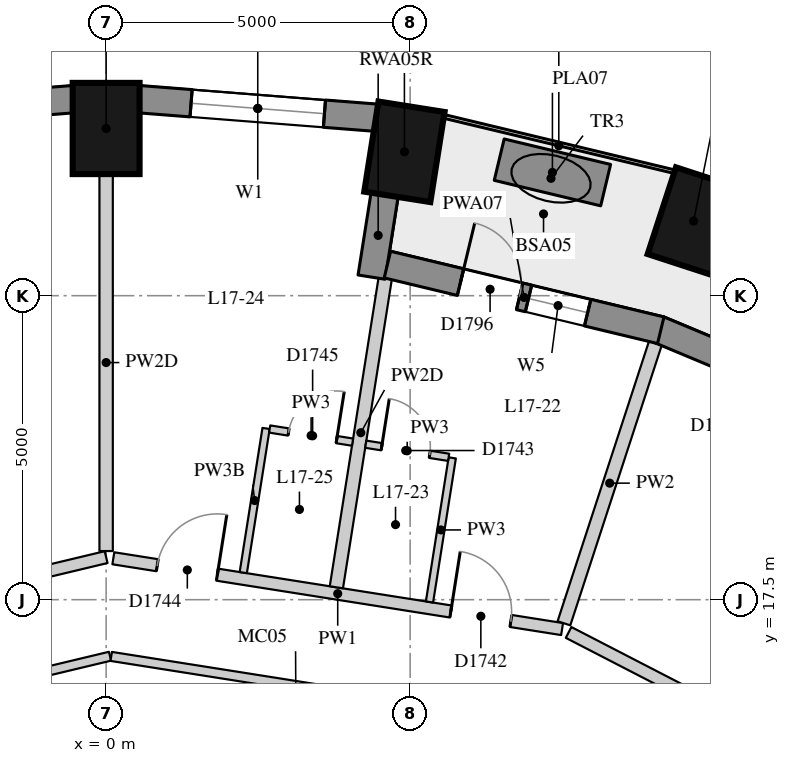
"""IFC4 building model, lengths in metres.
Left out: names, types, materials, properties, quantities, classifications, styles, units other than length and angle.
Written with IfcOpenShell. Run it as: python <this file> out.ifc"""

import sys

from ifc_helpers import new_model, si_unit, direction, frame, frame_2d, origin, origin_2d, place, context, subcontext, project, spatial, rectangle, extrude, element, fill, save


model = new_model("IFC4")
c1 = context("Model", 3, precision=1e-05, world=origin(), true_north=direction((0.0, 1.0)))
c2 = subcontext(c1, "Body", "Model", "MODEL_VIEW")
j1 = project(units=[si_unit("LENGTHUNIT", "METRE"), si_unit("PLANEANGLEUNIT", "RADIAN")], contexts=[c1])
p1 = place(None, origin())
s1 = spatial("IfcSite", under=j1, at=p1, CompositionType="ELEMENT")
p2 = place(p1, origin())
s2 = spatial("IfcBuilding", under=s1, at=p2, CompositionType="ELEMENT")
p3 = place(p2, frame((0.0, 0.0, 64.6)))
s3 = spatial("IfcBuildingStorey", under=s2, at=p3, CompositionType="ELEMENT", Elevation=64.6)
for number, where, z_axis, x_axis in (
    (1, (9.662, 23.727, 0.0), (0.0, 0.0, 1.0), (0.31, 0.951, 0.0)),
    (2, (4.906, 24.866, 0.0), (0.0, 0.0, 1.0), (0.156, 0.988, 0.0)),
    (3, (0.0, 25.25, 0.0), (0.0, 0.0, 1.0), (0.0, 1.0, 0.0)),
):
    element("IfcColumn", number, at=place(p3, frame(where, z_axis=z_axis, x_axis=x_axis)), inside=s3, PredefinedType="COLUMN", context=c2, shape_type="SweptSolid", body=[
        extrude(rectangle(XDim=1.5, YDim=1.1, at=origin_2d()), origin(), (0.0, 0.0, 1.0), 3.3),
    ])
p4 = place(p3, frame((4.457, 25.426, 0.0), z_axis=(0.0, 0.0, 1.0), x_axis=(-0.996955972145, 0.077966592873, 0.0)))
e4 = element("IfcWall", 4, at=p4, inside=s3, PredefinedType="SOLIDWALL", context=c2, shape_type="SweptSolid", body=[
    extrude(rectangle(XDim=3.939, YDim=0.45, at=frame_2d((1.97, 0.0))), origin(), (0.0, 0.0, 1.0), 3.02),
])
p5 = place(p4, frame((0.87, 0.0, 0.4)))
e5 = element("IfcOpeningElement", 5, at=p5, cuts=e4, PredefinedType="OPENING", context=c2, shape_type="SweptSolid", body=[
    extrude(rectangle(XDim=2.2, YDim=1.75, at=frame_2d((1.1, 0.875))), frame((0.0, 0.235, 0.0), z_axis=(0.0, -1.0, 0.0), x_axis=(1.0, 0.0, 0.0)), (0.0, 0.0, 1.0), 0.47),
])
p6 = place(p3, frame((-0.53, 25.733, 0.0), z_axis=(0.0, 0.0, 1.0), x_axis=(-0.996955972145, -0.077966592873, 0.0)))
e6 = element("IfcWall", 6, at=p6, inside=s3, PredefinedType="SOLIDWALL", context=c2, shape_type="SweptSolid", body=[
    extrude(rectangle(XDim=3.939, YDim=0.45, at=frame_2d((1.97, 0.0))), origin(), (0.0, 0.0, 1.0), 3.02),
])
p7 = place(p6, frame((0.87, 0.0, 0.4)))
e7 = element("IfcOpeningElement", 7, at=p7, cuts=e6, PredefinedType="OPENING", context=c2, shape_type="SweptSolid", body=[
    extrude(rectangle(XDim=2.2, YDim=1.75, at=frame_2d((1.1, 0.875))), frame((0.0, 0.235, 0.0), z_axis=(0.0, -1.0, 0.0), x_axis=(1.0, 0.0, 0.0)), (0.0, 0.0, 1.0), 0.47),
])
p8 = place(p3, frame((4.583, 24.178, 0.0), z_axis=(0.0, 0.0, 1.0), x_axis=(-0.156133927791, -0.98773589415, 0.0)))
e8 = element("IfcWall", 8, at=p8, inside=s3, PredefinedType="SOLIDWALL", context=c2, shape_type="SweptSolid", body=[
    extrude(rectangle(XDim=1.39, YDim=0.45, at=frame_2d((0.695, 0.0))), origin(), (0.0, 0.0, 1.0), 2.47),
])
p9 = place(p3, frame((13.31, 20.178, 0.0), z_axis=(0.0, 0.0, 1.0), x_axis=(-0.922634412489, 0.385675693935, 0.0)))
e9 = element("IfcWall", 9, at=p9, inside=s3, PredefinedType="SOLIDWALL", context=c2, shape_type="SweptSolid", body=[
    extrude(rectangle(XDim=4.577, YDim=0.45, at=frame_2d((2.288, 0.0))), origin(), (0.0, 0.0, 1.0), 3.02),
])
p10 = place(p9, frame((1.213, 0.0, 0.4)))
e10 = element("IfcOpeningElement", 10, at=p10, cuts=e9, PredefinedType="OPENING", context=c2, shape_type="SweptSolid", body=[
    extrude(rectangle(XDim=1.0, YDim=1.75, at=frame_2d((0.5, 0.875))), frame((0.0, 0.235, 0.0), z_axis=(0.0, -1.0, 0.0), x_axis=(1.0, 0.0, 0.0)), (0.0, 0.0, 1.0), 0.47),
])
p11 = place(p9, frame((2.363, 0.0, 0.0)))
e11 = element("IfcOpeningElement", 11, at=p11, cuts=e9, PredefinedType="OPENING", context=c2, shape_type="SweptSolid", body=[
    extrude(rectangle(XDim=1.0, YDim=2.15, at=frame_2d((0.5, 1.075))), frame((0.0, 0.235, 0.0), z_axis=(0.0, -1.0, 0.0), x_axis=(1.0, 0.0, 0.0)), (0.0, 0.0, 1.0), 0.47),
])
p12 = place(p3, frame((9.122, 21.932, 0.0), z_axis=(0.0, 0.0, 1.0), x_axis=(-0.972346547441, 0.233542697764, 0.0)))
e12 = element("IfcWall", 12, at=p12, inside=s3, PredefinedType="SOLIDWALL", context=c2, shape_type="SweptSolid", body=[
    extrude(rectangle(XDim=4.624, YDim=0.45, at=frame_2d((2.312, 0.0))), origin(), (0.0, 0.0, 1.0), 3.02),
])
p13 = place(p12, frame((1.237, 0.0, 0.4)))
e13 = element("IfcOpeningElement", 13, at=p13, cuts=e12, PredefinedType="OPENING", context=c2, shape_type="SweptSolid", body=[
    extrude(rectangle(XDim=1.0, YDim=1.75, at=frame_2d((0.5, 0.875))), frame((0.0, 0.235, 0.0), z_axis=(0.0, -1.0, 0.0), x_axis=(1.0, 0.0, 0.0)), (0.0, 0.0, 1.0), 0.47),
])
p14 = place(p12, frame((2.387, 0.0, 0.0)))
e14 = element("IfcOpeningElement", 14, at=p14, cuts=e12, PredefinedType="OPENING", context=c2, shape_type="SweptSolid", body=[
    extrude(rectangle(XDim=1.0, YDim=2.15, at=frame_2d((0.5, 1.075))), frame((0.0, 0.235, 0.0), z_axis=(0.0, -1.0, 0.0), x_axis=(1.0, 0.0, 0.0)), (0.0, 0.0, 1.0), 0.47),
])
p15 = place(p3, frame((8.215, 24.318, 0.0), z_axis=(0.0, 0.0, 1.0), x_axis=(-0.972504142103, 0.232885580473, 0.0)))
e15 = element("IfcWall", 15, at=p15, inside=s3, PredefinedType="USERDEFINED", context=c2, shape_type="SweptSolid", body=[
    extrude(rectangle(XDim=1.8, YDim=0.7, at=frame_2d((0.9, 0.0))), origin(), (0.0, 0.0, 1.0), 0.75),
])
p16 = place(p3, frame((-10.852, 15.605, 0.0), z_axis=(0.0, 0.0, 1.0), x_axis=(0.972573296372, 0.232596610431, 0.0)))
e16 = element("IfcWall", 16, at=p16, inside=s3, PredefinedType="PARTITIONING", context=c2, shape_type="SweptSolid", body=[
    extrude(rectangle(XDim=11.157, YDim=0.2, at=frame_2d((5.579, 0.0))), origin(), (0.0, 0.0, 1.0), 3.02),
])
p17 = place(p16, frame((6.029, 0.0, 0.0)))
e17 = element("IfcOpeningElement", 17, at=p17, cuts=e16, PredefinedType="OPENING", context=c2, shape_type="SweptSolid", body=[
    extrude(rectangle(XDim=1.1, YDim=2.1, at=frame_2d((0.55, 1.05))), frame((0.0, 0.11, 0.0), z_axis=(0.0, -1.0, 0.0), x_axis=(1.0, 0.0, 0.0)), (0.0, 0.0, 1.0), 0.22),
])
p18 = place(p16, frame((0.705, 0.0, 0.0)))
e18 = element("IfcOpeningElement", 18, at=p18, cuts=e16, PredefinedType="OPENING", context=c2, shape_type="SweptSolid", body=[
    extrude(rectangle(XDim=1.0, YDim=2.1, at=frame_2d((0.5, 1.05))), frame((0.0, 0.11, 0.0), z_axis=(0.0, -1.0, 0.0), x_axis=(1.0, 0.0, 0.0)), (0.0, 0.0, 1.0), 0.22),
])
p19 = place(p3, frame((0.119, 18.181, 0.0), z_axis=(0.0, 0.0, 1.0), x_axis=(0.987788122462, -0.155803161464, 0.0)))
e19 = element("IfcWall", 19, at=p19, inside=s3, PredefinedType="PARTITIONING", context=c2, shape_type="SweptSolid", body=[
    extrude(rectangle(XDim=7.471, YDim=0.2, at=frame_2d((3.736, 0.0))), origin(), (0.0, 0.0, 1.0), 3.02),
])
p20 = place(p19, frame((5.619, 0.0, 0.0)))
e20 = element("IfcOpeningElement", 20, at=p20, cuts=e19, PredefinedType="OPENING", context=c2, shape_type="SweptSolid", body=[
    extrude(rectangle(XDim=1.0, YDim=2.1, at=frame_2d((0.5, 1.05))), frame((0.0, 0.11, 0.0), z_axis=(0.0, -1.0, 0.0), x_axis=(1.0, 0.0, 0.0)), (0.0, 0.0, 1.0), 0.22),
])
p21 = place(p19, frame((0.732, 0.0, 0.0)))
e21 = element("IfcOpeningElement", 21, at=p21, cuts=e19, PredefinedType="OPENING", context=c2, shape_type="SweptSolid", body=[
    extrude(rectangle(XDim=1.0, YDim=2.1, at=frame_2d((0.5, 1.05))), frame((0.0, 0.11, 0.0), z_axis=(0.0, -1.0, 0.0), x_axis=(1.0, 0.0, 0.0)), (0.0, 0.0, 1.0), 0.22),
])
p22 = place(p3, frame((7.606, 16.961, 0.0), z_axis=(0.0, 0.0, 1.0), x_axis=(0.888519518851, -0.45883882205, 0.0)))
e22 = element("IfcWall", 22, at=p22, inside=s3, PredefinedType="PARTITIONING", context=c2, shape_type="SweptSolid", body=[
    extrude(rectangle(XDim=7.142, YDim=0.2, at=frame_2d((3.571, 0.0))), origin(), (0.0, 0.0, 1.0), 3.02),
])
p23 = place(p22, frame((3.342, 0.0, 0.0)))
e23 = element("IfcOpeningElement", 23, at=p23, cuts=e22, PredefinedType="OPENING", context=c2, shape_type="SweptSolid", body=[
    extrude(rectangle(XDim=1.1, YDim=2.1, at=frame_2d((0.55, 1.05))), frame((0.0, 0.11, 0.0), z_axis=(0.0, -1.0, 0.0), x_axis=(1.0, 0.0, 0.0)), (0.0, 0.0, 1.0), 0.22),
])
p24 = place(p3, frame((-7.022, 14.875, 0.0), z_axis=(0.0, 0.0, 1.0), x_axis=(0.972565872543, 0.232627650043, 0.0)))
e24 = element("IfcWall", 24, at=p24, inside=s3, PredefinedType="PARTITIONING", context=c2, shape_type="SweptSolid", body=[
    extrude(rectangle(XDim=7.286, YDim=0.15, at=frame_2d((3.643, 0.0))), origin(), (0.0, 0.0, 1.0), 3.02),
])
p25 = place(p3, frame((0.083, 16.567, 0.0), z_axis=(0.0, 0.0, 1.0), x_axis=(0.987781067139, -0.15584788546, 0.0)))
e25 = element("IfcWall", 25, at=p25, inside=s3, PredefinedType="PARTITIONING", context=c2, shape_type="SweptSolid", body=[
    extrude(rectangle(XDim=6.996, YDim=0.15, at=frame_2d((3.498, 0.0))), origin(), (0.0, 0.0, 1.0), 3.02),
])
p26 = place(p3, frame((9.034, 21.721, 0.0), z_axis=(0.0, 0.0, 1.0), x_axis=(-0.310330277344, -0.95062880188, 0.0)))
e26 = element("IfcWall", 26, at=p26, inside=s3, PredefinedType="PARTITIONING", context=c2, shape_type="SweptSolid", body=[
    extrude(rectangle(XDim=4.848, YDim=0.22, at=frame_2d((2.424, 0.0))), origin(), (0.0, 0.0, 1.0), 3.02),
])
p27 = place(p3, frame((4.591, 22.789, 0.0), z_axis=(0.0, 0.0, 1.0), x_axis=(-0.156172011014, -0.987729873486, 0.0)))
e27 = element("IfcWall", 27, at=p27, inside=s3, PredefinedType="PARTITIONING", context=c2, shape_type="SweptSolid", body=[
    extrude(rectangle(XDim=5.148, YDim=0.22, at=frame_2d((2.574, 0.0))), origin(), (0.0, 0.0, 1.0), 2.47),
])
p28 = place(p3, frame((0.0, 24.5, 0.0), z_axis=(0.0, 0.0, 1.0), x_axis=(0.0, -1.0, 0.0)))
e28 = element("IfcWall", 28, at=p28, inside=s3, PredefinedType="PARTITIONING", context=c2, shape_type="SweptSolid", body=[
    extrude(rectangle(XDim=6.2, YDim=0.22, at=frame_2d((3.1, 0.0))), origin(), (0.0, 0.0, 1.0), 2.47),
])
p29 = place(p3, frame((5.318, 17.462, 0.0), z_axis=(0.0, 0.0, 1.0), x_axis=(0.156077517275, 0.987744809453, 0.0)))
e29 = element("IfcWall", 29, at=p29, inside=s3, PredefinedType="PARTITIONING", context=c2, shape_type="SweptSolid", body=[
    extrude(rectangle(XDim=2.399, YDim=0.12, at=frame_2d((1.2, 0.0))), origin(), (0.0, 0.0, 1.0), 3.02),
])
p30 = place(p3, frame((2.256, 17.945, 0.0), z_axis=(0.0, 0.0, 1.0), x_axis=(0.156114026572, 0.987739039781, 0.0)))
e30 = element("IfcWall", 30, at=p30, inside=s3, PredefinedType="PARTITIONING", context=c2, shape_type="SweptSolid", body=[
    extrude(rectangle(XDim=2.401, YDim=0.12, at=frame_2d((1.2, 0.0))), origin(), (0.0, 0.0, 1.0), 2.47),
])
p31 = place(p3, frame((5.633, 19.842, 0.0), z_axis=(0.0, 0.0, 1.0), x_axis=(-0.987722767831, 0.156216945011, 0.0)))
e31 = element("IfcWall", 31, at=p31, inside=s3, PredefinedType="PARTITIONING", context=c2, shape_type="SweptSolid", body=[
    extrude(rectangle(XDim=1.38, YDim=0.12, at=frame_2d((0.69, 0.0))), origin(), (0.0, 0.0, 1.0), 3.02),
])
p32 = place(p31, frame((0.315, 0.0, 0.0)))
e32 = element("IfcOpeningElement", 32, at=p32, cuts=e31, PredefinedType="OPENING", context=c2, shape_type="SweptSolid", body=[
    extrude(rectangle(XDim=0.8, YDim=2.1, at=frame_2d((0.4, 1.05))), frame((0.0, 0.07, 0.0), z_axis=(0.0, -1.0, 0.0), x_axis=(1.0, 0.0, 0.0)), (0.0, 0.0, 1.0), 0.14),
])
p33 = place(p3, frame((2.69, 20.307, 0.0), z_axis=(0.0, 0.0, 1.0), x_axis=(0.987695455518, -0.156389536571, 0.0)))
e33 = element("IfcWall", 33, at=p33, inside=s3, PredefinedType="PARTITIONING", context=c2, shape_type="SweptSolid", body=[
    extrude(rectangle(XDim=1.38, YDim=0.12, at=frame_2d((0.69, 0.0))), origin(), (0.0, 0.0, 1.0), 3.02),
])
p34 = place(p33, frame((0.315, 0.0, 0.0)))
e34 = element("IfcOpeningElement", 34, at=p34, cuts=e33, PredefinedType="OPENING", context=c2, shape_type="SweptSolid", body=[
    extrude(rectangle(XDim=0.8, YDim=2.1, at=frame_2d((0.4, 1.05))), frame((0.0, 0.07, 0.0), z_axis=(0.0, -1.0, 0.0), x_axis=(1.0, 0.0, 0.0)), (0.0, 0.0, 1.0), 0.14),
])
p35 = place(p5, origin())
e35 = element("IfcWindow", 35, at=p35, inside=s3, PartitioningType="SINGLE_PANEL", PredefinedType="WINDOW", context=c2, shape_type="SweptSolid", body=[
    extrude(rectangle(XDim=2.2, YDim=1.75, at=frame_2d((1.1, 0.875))), frame((0.0, 0.035, 0.0), z_axis=(0.0, -1.0, 0.0), x_axis=(1.0, 0.0, 0.0)), (0.0, 0.0, 1.0), 0.06),
])
fill(e5, e35)
p36 = place(p13, origin())
e36 = element("IfcWindow", 36, at=p36, inside=s3, PartitioningType="SINGLE_PANEL", PredefinedType="WINDOW", context=c2, shape_type="SweptSolid", body=[
    extrude(rectangle(XDim=1.0, YDim=1.75, at=frame_2d((0.5, 0.875))), frame((0.0, 0.035, 0.0), z_axis=(0.0, -1.0, 0.0), x_axis=(1.0, 0.0, 0.0)), (0.0, 0.0, 1.0), 0.06),
])
fill(e13, e36)
p37 = place(p14, frame((1.0, 0.0, 0.0), z_axis=(0.0, 0.0, 1.0), x_axis=(-1.0, 0.0, 0.0)))
e37 = element("IfcDoor", 37, at=p37, inside=s3, OperationType="SINGLE_SWING_LEFT", PredefinedType="DOOR", context=c2, shape_type="SweptSolid", body=[
    extrude(rectangle(XDim=1.0, YDim=2.15, at=frame_2d((0.5, 1.075))), frame((0.0, 0.075, 0.0), z_axis=(0.0, -1.0, 0.0), x_axis=(1.0, 0.0, 0.0)), (0.0, 0.0, 1.0), 0.05),
])
fill(e14, e37)
p38 = place(p20, origin())
e38 = element("IfcDoor", 38, at=p38, inside=s3, OperationType="SINGLE_SWING_LEFT", PredefinedType="DOOR", context=c2, shape_type="SweptSolid", body=[
    extrude(rectangle(XDim=1.0, YDim=2.1, at=frame_2d((0.5, 1.05))), frame((0.0, 0.025, 0.0), z_axis=(0.0, -1.0, 0.0), x_axis=(1.0, 0.0, 0.0)), (0.0, 0.0, 1.0), 0.05),
])
fill(e20, e38)
p39 = place(p32, origin())
e39 = element("IfcDoor", 39, at=p39, inside=s3, OperationType="SINGLE_SWING_LEFT", PredefinedType="DOOR", context=c2, shape_type="SweptSolid", body=[
    extrude(rectangle(XDim=0.8, YDim=2.1, at=frame_2d((0.4, 1.05))), frame((0.0, 0.025, 0.0), z_axis=(0.0, -1.0, 0.0), x_axis=(1.0, 0.0, 0.0)), (0.0, 0.0, 1.0), 0.05),
])
fill(e32, e39)
p40 = place(p21, origin())
e40 = element("IfcDoor", 40, at=p40, inside=s3, OperationType="SINGLE_SWING_RIGHT", PredefinedType="DOOR", context=c2, shape_type="SweptSolid", body=[
    extrude(rectangle(XDim=1.0, YDim=2.1, at=frame_2d((0.5, 1.05))), frame((0.0, 0.025, 0.0), z_axis=(0.0, -1.0, 0.0), x_axis=(1.0, 0.0, 0.0)), (0.0, 0.0, 1.0), 0.05),
])
fill(e21, e40)
p41 = place(p34, origin())
e41 = element("IfcDoor", 41, at=p41, inside=s3, OperationType="SINGLE_SWING_RIGHT", PredefinedType="DOOR", context=c2, shape_type="SweptSolid", body=[
    extrude(rectangle(XDim=0.8, YDim=2.1, at=frame_2d((0.4, 1.05))), frame((0.0, 0.025, 0.0), z_axis=(0.0, -1.0, 0.0), x_axis=(1.0, 0.0, 0.0)), (0.0, 0.0, 1.0), 0.05),
])
fill(e34, e41)
save(model, sys.argv[1])
